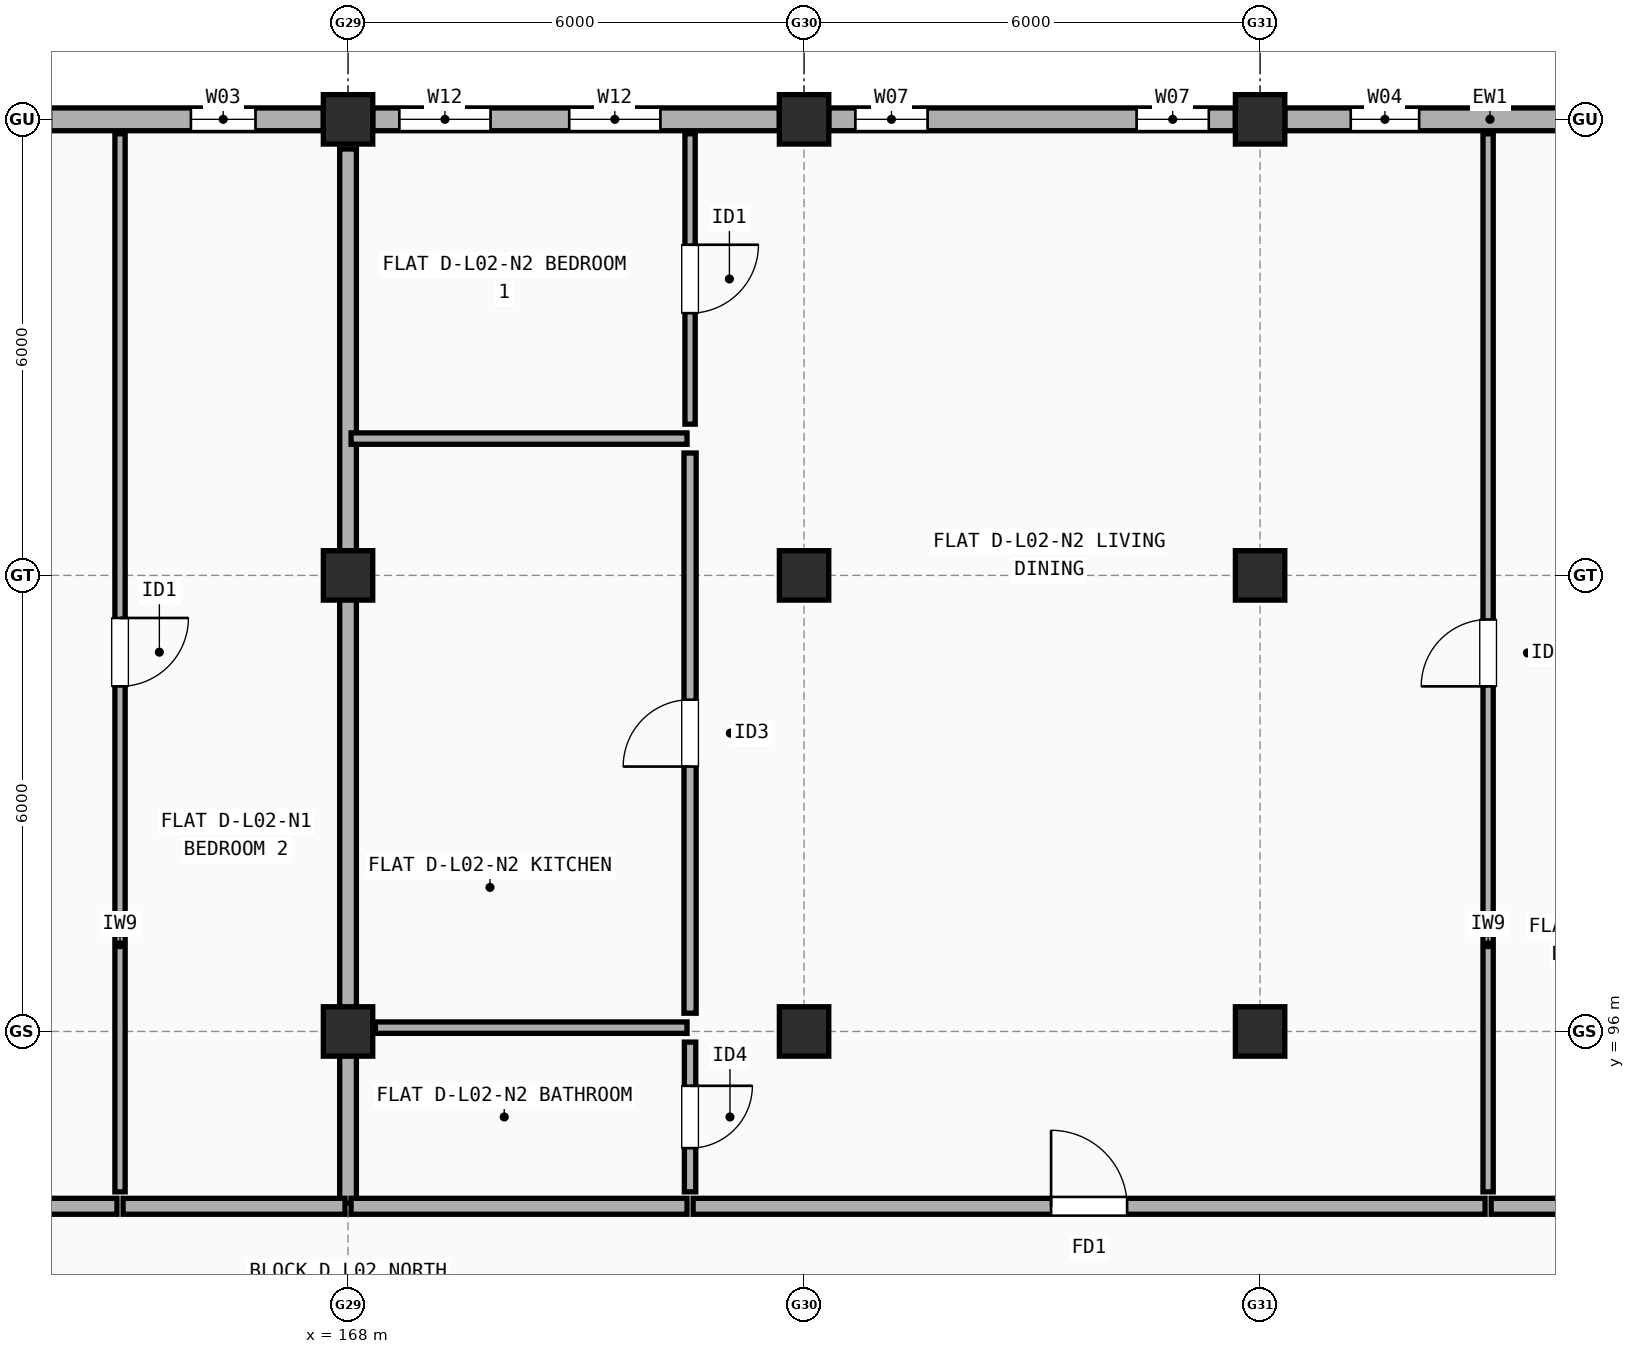
"""IFC4 building model, lengths in metres.
Left out: names, types, materials, properties, quantities, classifications, styles, units other than length and angle.
Written with IfcOpenShell. Run it as: python <this file> out.ifc"""

import sys

from ifc_helpers import new_model, si_unit, direction, frame, frame_2d, origin, origin_2d, place, context, subcontext, project, spatial, rectangle, extrude, element, fill, save


model = new_model("IFC4")
c1 = context("Model", 3, precision=1e-05, world=origin(), true_north=direction((0.0, 1.0)))
c2 = subcontext(c1, "Body", "Model", "MODEL_VIEW")
j1 = project(units=[si_unit("LENGTHUNIT", "METRE"), si_unit("PLANEANGLEUNIT", "RADIAN")], contexts=[c1])
p1 = place(None, origin())
s1 = spatial("IfcSite", under=j1, at=p1, CompositionType="ELEMENT")
p2 = place(p1, origin())
s2 = spatial("IfcBuilding", under=s1, at=p2, CompositionType="ELEMENT")
p3 = place(p2, frame((0.0, 0.0, 7.7)))
s3 = spatial("IfcBuildingStorey", under=s2, at=p3, CompositionType="ELEMENT", Elevation=7.7)
for number, where, z_axis, x_axis in (
    (1, (168.0, 96.0, 0.0), (0.0, 0.0, 1.0), (1.0, 0.0, 0.0)),
    (2, (168.0, 102.0, 0.0), (0.0, 0.0, 1.0), (1.0, 0.0, 0.0)),
    (3, (168.0, 108.0, 0.0), (0.0, 0.0, 1.0), (1.0, 0.0, 0.0)),
    (4, (174.0, 96.0, 0.0), (0.0, 0.0, 1.0), (1.0, 0.0, 0.0)),
    (5, (174.0, 102.0, 0.0), (0.0, 0.0, 1.0), (1.0, 0.0, 0.0)),
    (6, (174.0, 108.0, 0.0), (0.0, 0.0, 1.0), (1.0, 0.0, 0.0)),
    (7, (180.0, 96.0, 0.0), (0.0, 0.0, 1.0), (1.0, 0.0, 0.0)),
    (8, (180.0, 102.0, 0.0), (0.0, 0.0, 1.0), (1.0, 0.0, 0.0)),
    (9, (180.0, 108.0, 0.0), (0.0, 0.0, 1.0), (1.0, 0.0, 0.0)),
):
    element("IfcColumn", number, at=place(p3, frame(where, z_axis=z_axis, x_axis=x_axis)), inside=s3, PredefinedType="COLUMN", context=c2, shape_type="SweptSolid", body=[
        extrude(rectangle(XDim=0.65, YDim=0.65, at=origin_2d()), origin(), (0.0, 0.0, 1.0), 2.955),
    ])
p4 = place(p3, frame((185.725, 108.0, 0.0), z_axis=(0.0, 0.0, 1.0), x_axis=(-1.0, 0.0, 0.0)))
e10 = element("IfcWall", 10, at=p4, inside=s3, PredefinedType="STANDARD", context=c2, shape_type="SweptSolid", body=[
    extrude(rectangle(XDim=5.4, YDim=0.3, at=frame_2d((2.7, 0.0))), origin(), (0.0, 0.0, 1.0), 2.437),
])
p5 = place(p4, frame((0.917, 0.0, 0.9)))
e11 = element("IfcOpeningElement", 11, at=p5, cuts=e10, PredefinedType="OPENING", context=c2, shape_type="SweptSolid", body=[
    extrude(rectangle(XDim=0.85, YDim=1.25, at=frame_2d((0.425, 0.625))), frame((0.0, 0.16, 0.0), z_axis=(0.0, -1.0, 0.0), x_axis=(1.0, 0.0, 0.0)), (0.0, 0.0, 1.0), 0.32),
])
p6 = place(p4, frame((3.633, 0.0, 0.9)))
e12 = element("IfcOpeningElement", 12, at=p6, cuts=e10, PredefinedType="OPENING", context=c2, shape_type="SweptSolid", body=[
    extrude(rectangle(XDim=0.9, YDim=1.3, at=frame_2d((0.45, 0.65))), frame((0.0, 0.16, 0.0), z_axis=(0.0, -1.0, 0.0), x_axis=(1.0, 0.0, 0.0)), (0.0, 0.0, 1.0), 0.32),
])
p7 = place(p3, frame((179.675, 108.0, 0.0), z_axis=(0.0, 0.0, 1.0), x_axis=(-1.0, 0.0, 0.0)))
e13 = element("IfcWall", 13, at=p7, inside=s3, PredefinedType="STANDARD", context=c2, shape_type="SweptSolid", body=[
    extrude(rectangle(XDim=5.35, YDim=0.3, at=frame_2d((2.675, 0.0))), origin(), (0.0, 0.0, 1.0), 2.437),
])
p8 = place(p7, frame((0.35, 0.0, 0.9)))
e14 = element("IfcOpeningElement", 14, at=p8, cuts=e13, PredefinedType="OPENING", context=c2, shape_type="SweptSolid", body=[
    extrude(rectangle(XDim=0.95, YDim=1.35, at=frame_2d((0.475, 0.675))), frame((0.0, 0.16, 0.0), z_axis=(0.0, -1.0, 0.0), x_axis=(1.0, 0.0, 0.0)), (0.0, 0.0, 1.0), 0.32),
])
p9 = place(p7, frame((4.05, 0.0, 0.9)))
e15 = element("IfcOpeningElement", 15, at=p9, cuts=e13, PredefinedType="OPENING", context=c2, shape_type="SweptSolid", body=[
    extrude(rectangle(XDim=0.95, YDim=1.35, at=frame_2d((0.475, 0.675))), frame((0.0, 0.16, 0.0), z_axis=(0.0, -1.0, 0.0), x_axis=(1.0, 0.0, 0.0)), (0.0, 0.0, 1.0), 0.32),
])
p10 = place(p3, frame((173.675, 108.0, 0.0), z_axis=(0.0, 0.0, 1.0), x_axis=(-1.0, 0.0, 0.0)))
e16 = element("IfcWall", 16, at=p10, inside=s3, PredefinedType="STANDARD", context=c2, shape_type="SweptSolid", body=[
    extrude(rectangle(XDim=5.35, YDim=0.3, at=frame_2d((2.675, 0.0))), origin(), (0.0, 0.0, 1.0), 2.437),
])
p11 = place(p10, frame((1.565, 0.0, 0.9)))
e17 = element("IfcOpeningElement", 17, at=p11, cuts=e16, PredefinedType="OPENING", context=c2, shape_type="SweptSolid", body=[
    extrude(rectangle(XDim=1.2, YDim=1.35, at=frame_2d((0.6, 0.675))), frame((0.0, 0.16, 0.0), z_axis=(0.0, -1.0, 0.0), x_axis=(1.0, 0.0, 0.0)), (0.0, 0.0, 1.0), 0.32),
])
p12 = place(p10, frame((3.8, 0.0, 0.9)))
e18 = element("IfcOpeningElement", 18, at=p12, cuts=e16, PredefinedType="OPENING", context=c2, shape_type="SweptSolid", body=[
    extrude(rectangle(XDim=1.2, YDim=1.35, at=frame_2d((0.6, 0.675))), frame((0.0, 0.16, 0.0), z_axis=(0.0, -1.0, 0.0), x_axis=(1.0, 0.0, 0.0)), (0.0, 0.0, 1.0), 0.32),
])
p13 = place(p3, frame((167.675, 108.0, 0.0), z_axis=(0.0, 0.0, 1.0), x_axis=(-1.0, 0.0, 0.0)))
e19 = element("IfcWall", 19, at=p13, inside=s3, PredefinedType="STANDARD", context=c2, shape_type="SweptSolid", body=[
    extrude(rectangle(XDim=5.35, YDim=0.3, at=frame_2d((2.675, 0.0))), origin(), (0.0, 0.0, 1.0), 2.437),
])
p14 = place(p13, frame((0.893, 0.0, 0.9)))
e20 = element("IfcOpeningElement", 20, at=p14, cuts=e19, PredefinedType="OPENING", context=c2, shape_type="SweptSolid", body=[
    extrude(rectangle(XDim=0.85, YDim=1.25, at=frame_2d((0.425, 0.625))), frame((0.0, 0.16, 0.0), z_axis=(0.0, -1.0, 0.0), x_axis=(1.0, 0.0, 0.0)), (0.0, 0.0, 1.0), 0.32),
])
p15 = place(p13, frame((3.583, 0.0, 0.9)))
e21 = element("IfcOpeningElement", 21, at=p15, cuts=e19, PredefinedType="OPENING", context=c2, shape_type="SweptSolid", body=[
    extrude(rectangle(XDim=0.9, YDim=1.3, at=frame_2d((0.45, 0.65))), frame((0.0, 0.16, 0.0), z_axis=(0.0, -1.0, 0.0), x_axis=(1.0, 0.0, 0.0)), (0.0, 0.0, 1.0), 0.32),
])
p16 = place(p3, frame((168.0, 93.74, 0.0), z_axis=(0.0, 0.0, 1.0), x_axis=(0.0, 1.0, 0.0)))
e22 = element("IfcWall", 22, at=p16, inside=s3, PredefinedType="SOLIDWALL", context=c2, shape_type="SweptSolid", body=[
    extrude(rectangle(XDim=13.87, YDim=0.22, at=frame_2d((6.935, 0.0))), origin(), (0.0, 0.0, 1.0), 2.337),
])
p17 = place(p3, frame((154.54, 93.7, 0.0), z_axis=(0.0, 0.0, 1.0), x_axis=(1.0, 0.0, 0.0)))
e23 = element("IfcWall", 23, at=p17, inside=s3, PredefinedType="SOLIDWALL", context=c2, shape_type="SweptSolid", body=[
    extrude(rectangle(XDim=10.42, YDim=0.21, at=frame_2d((5.21, 0.0))), origin(), (0.0, 0.0, 1.0), 2.437),
])
p18 = place(p17, frame((4.72, 0.0, 0.0)))
e24 = element("IfcOpeningElement", 24, at=p18, cuts=e23, PredefinedType="OPENING", context=c2, shape_type="SweptSolid", body=[
    extrude(rectangle(XDim=0.98, YDim=2.15, at=frame_2d((0.49, 1.075))), frame((0.0, 0.115, 0.0), z_axis=(0.0, -1.0, 0.0), x_axis=(1.0, 0.0, 0.0)), (0.0, 0.0, 1.0), 0.23),
])
p19 = place(p3, frame((165.04, 93.7, 0.0), z_axis=(0.0, 0.0, 1.0), x_axis=(1.0, 0.0, 0.0)))
e25 = element("IfcWall", 25, at=p19, inside=s3, PredefinedType="SOLIDWALL", context=c2, shape_type="SweptSolid", body=[
    extrude(rectangle(XDim=2.92, YDim=0.21, at=frame_2d((1.46, 0.0))), origin(), (0.0, 0.0, 1.0), 2.508),
])
p20 = place(p3, frame((165.0, 93.89, 0.0), z_axis=(0.0, 0.0, 1.0), x_axis=(0.0, 1.0, 0.0)))
e26 = element("IfcWall", 26, at=p20, inside=s3, PredefinedType="PARTITIONING", context=c2, shape_type="SweptSolid", body=[
    extrude(rectangle(XDim=13.92, YDim=0.135, at=frame_2d((6.96, 0.0))), origin(), (0.0, 0.0, 1.0), 2.387),
])
p21 = place(p20, frame((6.65, 0.0, 0.0)))
e27 = element("IfcOpeningElement", 27, at=p21, cuts=e26, PredefinedType="OPENING", context=c2, shape_type="SweptSolid", body=[
    extrude(rectangle(XDim=0.9, YDim=2.1, at=frame_2d((0.45, 1.05))), frame((0.0, 0.077, 0.0), z_axis=(0.0, -1.0, 0.0), x_axis=(1.0, 0.0, 0.0)), (0.0, 0.0, 1.0), 0.155),
])
p22 = place(p3, frame((168.04, 93.7, 0.0), z_axis=(0.0, 0.0, 1.0), x_axis=(1.0, 0.0, 0.0)))
e28 = element("IfcWall", 28, at=p22, inside=s3, PredefinedType="SOLIDWALL", context=c2, shape_type="SweptSolid", body=[
    extrude(rectangle(XDim=4.42, YDim=0.21, at=frame_2d((2.21, 0.0))), origin(), (0.0, 0.0, 1.0), 2.508),
])
p23 = place(p3, frame((172.54, 93.7, 0.0), z_axis=(0.0, 0.0, 1.0), x_axis=(1.0, 0.0, 0.0)))
e29 = element("IfcWall", 29, at=p23, inside=s3, PredefinedType="SOLIDWALL", context=c2, shape_type="SweptSolid", body=[
    extrude(rectangle(XDim=10.42, YDim=0.21, at=frame_2d((5.21, 0.0))), origin(), (0.0, 0.0, 1.0), 2.955),
])
p24 = place(p23, frame((4.71, 0.0, 0.0)))
e30 = element("IfcOpeningElement", 30, at=p24, cuts=e29, PredefinedType="OPENING", context=c2, shape_type="SweptSolid", body=[
    extrude(rectangle(XDim=1.0, YDim=2.15, at=frame_2d((0.5, 1.075))), frame((0.0, 0.115, 0.0), z_axis=(0.0, -1.0, 0.0), x_axis=(1.0, 0.0, 0.0)), (0.0, 0.0, 1.0), 0.23),
])
p25 = place(p3, frame((172.5, 103.99, 0.0), z_axis=(0.0, 0.0, 1.0), x_axis=(0.0, 1.0, 0.0)))
e31 = element("IfcWall", 31, at=p25, inside=s3, PredefinedType="PARTITIONING", context=c2, shape_type="SweptSolid", body=[
    extrude(rectangle(XDim=3.82, YDim=0.135, at=frame_2d((1.91, 0.0))), origin(), (0.0, 0.0, 1.0), 2.955),
])
p26 = place(p25, frame((1.46, 0.0, 0.0)))
e32 = element("IfcOpeningElement", 32, at=p26, cuts=e31, PredefinedType="OPENING", context=c2, shape_type="SweptSolid", body=[
    extrude(rectangle(XDim=0.9, YDim=2.1, at=frame_2d((0.45, 1.05))), frame((0.0, 0.077, 0.0), z_axis=(0.0, -1.0, 0.0), x_axis=(1.0, 0.0, 0.0)), (0.0, 0.0, 1.0), 0.155),
])
p27 = place(p3, frame((172.5, 96.24, 0.0), z_axis=(0.0, 0.0, 1.0), x_axis=(0.0, 1.0, 0.0)))
e33 = element("IfcWall", 33, at=p27, inside=s3, PredefinedType="PLUMBINGWALL", context=c2, shape_type="SweptSolid", body=[
    extrude(rectangle(XDim=7.37, YDim=0.16, at=frame_2d((3.685, 0.0))), origin(), (0.0, 0.0, 1.0), 2.437),
])
p28 = place(p27, frame((3.245, 0.0, 0.0)))
e34 = element("IfcOpeningElement", 34, at=p28, cuts=e33, PredefinedType="OPENING", context=c2, shape_type="SweptSolid", body=[
    extrude(rectangle(XDim=0.88, YDim=2.1, at=frame_2d((0.44, 1.05))), frame((0.0, 0.09, 0.0), z_axis=(0.0, -1.0, 0.0), x_axis=(1.0, 0.0, 0.0)), (0.0, 0.0, 1.0), 0.18),
])
p29 = place(p3, frame((172.5, 93.89, 0.0), z_axis=(0.0, 0.0, 1.0), x_axis=(0.0, 1.0, 0.0)))
e35 = element("IfcWall", 35, at=p29, inside=s3, PredefinedType="PARTITIONING", context=c2, shape_type="SweptSolid", body=[
    extrude(rectangle(XDim=1.97, YDim=0.15, at=frame_2d((0.985, 0.0))), origin(), (0.0, 0.0, 1.0), 2.955),
])
p30 = place(p29, frame((0.575, 0.0, 0.0)))
e36 = element("IfcOpeningElement", 36, at=p30, cuts=e35, PredefinedType="OPENING", context=c2, shape_type="SweptSolid", body=[
    extrude(rectangle(XDim=0.82, YDim=2.08, at=frame_2d((0.41, 1.04))), frame((0.0, 0.085, 0.0), z_axis=(0.0, -1.0, 0.0), x_axis=(1.0, 0.0, 0.0)), (0.0, 0.0, 1.0), 0.17),
])
p31 = place(p3, frame((168.04, 103.8, 0.0), z_axis=(0.0, 0.0, 1.0), x_axis=(1.0, 0.0, 0.0)))
e37 = element("IfcWall", 37, at=p31, inside=s3, PredefinedType="PARTITIONING", context=c2, shape_type="SweptSolid", body=[
    extrude(rectangle(XDim=4.42, YDim=0.15, at=frame_2d((2.21, 0.0))), origin(), (0.0, 0.0, 1.0), 2.337),
])
p32 = place(p3, frame((168.36, 96.05, 0.0), z_axis=(0.0, 0.0, 1.0), x_axis=(1.0, 0.0, 0.0)))
e38 = element("IfcWall", 38, at=p32, inside=s3, PredefinedType="PARTITIONING", context=c2, shape_type="SweptSolid", body=[
    extrude(rectangle(XDim=4.1, YDim=0.15, at=frame_2d((2.05, 0.0))), origin(), (0.0, 0.0, 1.0), 2.387),
])
p33 = place(p3, frame((183.04, 93.7, 0.0), z_axis=(0.0, 0.0, 1.0), x_axis=(1.0, 0.0, 0.0)))
e39 = element("IfcWall", 39, at=p33, inside=s3, PredefinedType="SOLIDWALL", context=c2, shape_type="SweptSolid", body=[
    extrude(rectangle(XDim=2.92, YDim=0.21, at=frame_2d((1.46, 0.0))), origin(), (0.0, 0.0, 1.0), 2.437),
])
p34 = place(p3, frame((183.0, 93.89, 0.0), z_axis=(0.0, 0.0, 1.0), x_axis=(0.0, 1.0, 0.0)))
e40 = element("IfcWall", 40, at=p34, inside=s3, PredefinedType="PARTITIONING", context=c2, shape_type="SweptSolid", body=[
    extrude(rectangle(XDim=13.92, YDim=0.135, at=frame_2d((6.96, 0.0))), origin(), (0.0, 0.0, 1.0), 2.387),
])
p35 = place(p34, frame((6.65, 0.0, 0.0)))
e41 = element("IfcOpeningElement", 41, at=p35, cuts=e40, PredefinedType="OPENING", context=c2, shape_type="SweptSolid", body=[
    extrude(rectangle(XDim=0.88, YDim=2.1, at=frame_2d((0.44, 1.05))), frame((0.0, 0.077, 0.0), z_axis=(0.0, -1.0, 0.0), x_axis=(1.0, 0.0, 0.0)), (0.0, 0.0, 1.0), 0.155),
])
p36 = place(p6, origin())
e42 = element("IfcWindow", 42, at=p36, inside=s3, PartitioningType="SINGLE_PANEL", PredefinedType="WINDOW", context=c2, shape_type="SweptSolid", body=[
    extrude(rectangle(XDim=0.9, YDim=1.3, at=frame_2d((0.45, 0.65))), frame((0.0, 0.03, 0.0), z_axis=(0.0, -1.0, 0.0), x_axis=(1.0, 0.0, 0.0)), (0.0, 0.0, 1.0), 0.06),
])
fill(e12, e42)
p37 = place(p8, origin())
e43 = element("IfcWindow", 43, at=p37, inside=s3, PartitioningType="SINGLE_PANEL", PredefinedType="WINDOW", context=c2, shape_type="SweptSolid", body=[
    extrude(rectangle(XDim=0.95, YDim=1.35, at=frame_2d((0.475, 0.675))), frame((0.0, 0.03, 0.0), z_axis=(0.0, -1.0, 0.0), x_axis=(1.0, 0.0, 0.0)), (0.0, 0.0, 1.0), 0.06),
])
fill(e14, e43)
p38 = place(p9, origin())
e44 = element("IfcWindow", 44, at=p38, inside=s3, PartitioningType="SINGLE_PANEL", PredefinedType="WINDOW", context=c2, shape_type="SweptSolid", body=[
    extrude(rectangle(XDim=0.95, YDim=1.35, at=frame_2d((0.475, 0.675))), frame((0.0, 0.03, 0.0), z_axis=(0.0, -1.0, 0.0), x_axis=(1.0, 0.0, 0.0)), (0.0, 0.0, 1.0), 0.06),
])
fill(e15, e44)
p39 = place(p11, origin())
e45 = element("IfcWindow", 45, at=p39, inside=s3, PartitioningType="SINGLE_PANEL", PredefinedType="WINDOW", context=c2, shape_type="SweptSolid", body=[
    extrude(rectangle(XDim=1.2, YDim=1.35, at=frame_2d((0.6, 0.675))), frame((0.0, 0.03, 0.0), z_axis=(0.0, -1.0, 0.0), x_axis=(1.0, 0.0, 0.0)), (0.0, 0.0, 1.0), 0.06),
])
fill(e17, e45)
p40 = place(p12, origin())
e46 = element("IfcWindow", 46, at=p40, inside=s3, PartitioningType="SINGLE_PANEL", PredefinedType="WINDOW", context=c2, shape_type="SweptSolid", body=[
    extrude(rectangle(XDim=1.2, YDim=1.35, at=frame_2d((0.6, 0.675))), frame((0.0, 0.03, 0.0), z_axis=(0.0, -1.0, 0.0), x_axis=(1.0, 0.0, 0.0)), (0.0, 0.0, 1.0), 0.06),
])
fill(e18, e46)
p41 = place(p14, origin())
e47 = element("IfcWindow", 47, at=p41, inside=s3, PartitioningType="SINGLE_PANEL", PredefinedType="WINDOW", context=c2, shape_type="SweptSolid", body=[
    extrude(rectangle(XDim=0.85, YDim=1.25, at=frame_2d((0.425, 0.625))), frame((0.0, 0.03, 0.0), z_axis=(0.0, -1.0, 0.0), x_axis=(1.0, 0.0, 0.0)), (0.0, 0.0, 1.0), 0.06),
])
fill(e20, e47)
p42 = place(p21, origin())
e48 = element("IfcDoor", 48, at=p42, inside=s3, OperationType="SINGLE_SWING_RIGHT", PredefinedType="DOOR", context=c2, shape_type="SweptSolid", body=[
    extrude(rectangle(XDim=0.9, YDim=2.1, at=frame_2d((0.45, 1.05))), frame((0.0, 0.025, 0.0), z_axis=(0.0, -1.0, 0.0), x_axis=(1.0, 0.0, 0.0)), (0.0, 0.0, 1.0), 0.05),
])
fill(e27, e48)
p43 = place(p24, origin())
e49 = element("IfcDoor", 49, at=p43, inside=s3, OperationType="SINGLE_SWING_LEFT", PredefinedType="DOOR", context=c2, shape_type="SweptSolid", body=[
    extrude(rectangle(XDim=1.0, YDim=2.15, at=frame_2d((0.5, 1.075))), frame((0.0, 0.025, 0.0), z_axis=(0.0, -1.0, 0.0), x_axis=(1.0, 0.0, 0.0)), (0.0, 0.0, 1.0), 0.05),
])
fill(e30, e49)
p44 = place(p26, origin())
e50 = element("IfcDoor", 50, at=p44, inside=s3, OperationType="SINGLE_SWING_RIGHT", PredefinedType="DOOR", context=c2, shape_type="SweptSolid", body=[
    extrude(rectangle(XDim=0.9, YDim=2.1, at=frame_2d((0.45, 1.05))), frame((0.0, 0.025, 0.0), z_axis=(0.0, -1.0, 0.0), x_axis=(1.0, 0.0, 0.0)), (0.0, 0.0, 1.0), 0.05),
])
fill(e32, e50)
p45 = place(p28, origin())
e51 = element("IfcDoor", 51, at=p45, inside=s3, OperationType="SINGLE_SWING_LEFT", PredefinedType="DOOR", context=c2, shape_type="SweptSolid", body=[
    extrude(rectangle(XDim=0.88, YDim=2.1, at=frame_2d((0.44, 1.05))), frame((0.0, 0.025, 0.0), z_axis=(0.0, -1.0, 0.0), x_axis=(1.0, 0.0, 0.0)), (0.0, 0.0, 1.0), 0.05),
])
fill(e34, e51)
p46 = place(p30, origin())
e52 = element("IfcDoor", 52, at=p46, inside=s3, OperationType="SINGLE_SWING_RIGHT", PredefinedType="DOOR", context=c2, shape_type="SweptSolid", body=[
    extrude(rectangle(XDim=0.82, YDim=2.08, at=frame_2d((0.41, 1.04))), frame((0.0, 0.025, 0.0), z_axis=(0.0, -1.0, 0.0), x_axis=(1.0, 0.0, 0.0)), (0.0, 0.0, 1.0), 0.05),
])
fill(e36, e52)
p47 = place(p35, origin())
e53 = element("IfcDoor", 53, at=p47, inside=s3, OperationType="SINGLE_SWING_LEFT", PredefinedType="DOOR", context=c2, shape_type="SweptSolid", body=[
    extrude(rectangle(XDim=0.88, YDim=2.1, at=frame_2d((0.44, 1.05))), frame((0.0, 0.025, 0.0), z_axis=(0.0, -1.0, 0.0), x_axis=(1.0, 0.0, 0.0)), (0.0, 0.0, 1.0), 0.05),
])
fill(e41, e53)
save(model, sys.argv[1])
